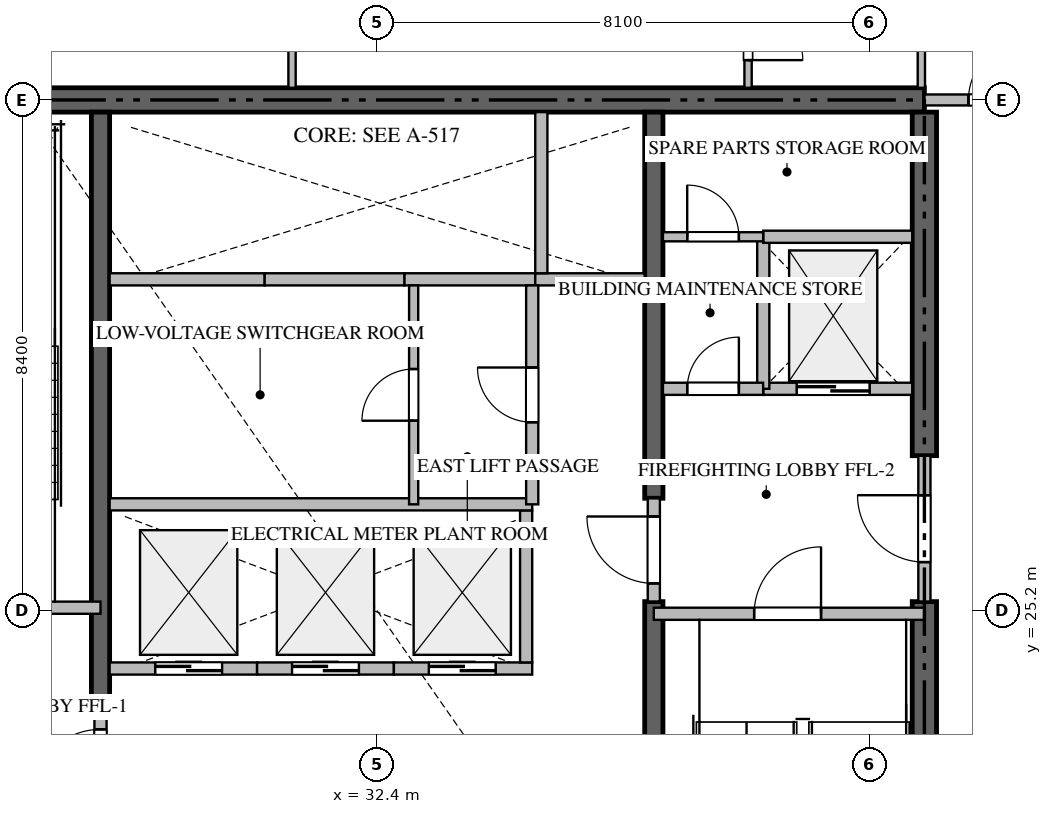
"""IFC4 building model, lengths in metres.
Left out: names, types, materials, properties, quantities, classifications, styles, units other than length and angle.
Written with IfcOpenShell. Run it as: python <this file> out.ifc"""

import sys

from ifc_helpers import new_model, si_unit, direction, frame, frame_2d, origin, place, context, subcontext, project, spatial, rectangle, extrude, source, transform, mapped, element, fill, save


model = new_model("IFC4")
c1 = context("Model", 3, precision=1e-05, world=origin(), true_north=direction((0.0, 1.0)))
c2 = subcontext(c1, "Body", "Model", "MODEL_VIEW")
j1 = project(units=[si_unit("LENGTHUNIT", "METRE"), si_unit("PLANEANGLEUNIT", "RADIAN")], contexts=[c1])
p1 = place(None, origin())
s1 = spatial("IfcSite", under=j1, at=p1, CompositionType="ELEMENT")
p2 = place(p1, origin())
s2 = spatial("IfcBuilding", under=s1, at=p2, CompositionType="ELEMENT")
p3 = place(p2, frame((0.0, 0.0, 142.65)))
s3 = spatial("IfcBuildingStorey", under=s2, at=p3, CompositionType="ELEMENT", Elevation=142.65)
p4 = place(p3, frame((41.4, 33.6, -0.26), z_axis=(0.0, 0.0, 1.0), x_axis=(-1.0, 0.0, 0.0)))
e1 = element("IfcWall", 1, at=p4, inside=s3, PredefinedType="SHEAR", context=c2, shape_type="SweptSolid", body=[
    extrude(rectangle(XDim=18.0, YDim=0.4, at=frame_2d((9.0, 0.0))), origin(), (0.0, 0.0, 1.0), 3.748),
])
p5 = place(p3, frame((41.4, 17.0, -0.26), z_axis=(0.0, 0.0, 1.0), x_axis=(0.0, 1.0, 0.0)))
e2 = element("IfcWall", 2, at=p5, inside=s3, PredefinedType="SHEAR", context=c2, shape_type="SweptSolid", body=[
    extrude(rectangle(XDim=8.35, YDim=0.4, at=frame_2d((4.175, 0.0))), origin(), (0.0, 0.0, 1.0), 3.748),
])
p6 = place(p3, frame((41.4, 27.75, -0.26), z_axis=(0.0, 0.0, 1.0), x_axis=(0.0, 1.0, 0.0)))
e3 = element("IfcWall", 3, at=p6, inside=s3, PredefinedType="SHEAR", context=c2, shape_type="SweptSolid", body=[
    extrude(rectangle(XDim=5.65, YDim=0.4, at=frame_2d((2.825, 0.0))), origin(), (0.0, 0.0, 1.0), 3.748),
])
p7 = place(p3, frame((27.85, 23.55, -0.26), z_axis=(0.0, 0.0, 1.0), x_axis=(0.0, 1.0, 0.0)))
e4 = element("IfcWall", 4, at=p7, inside=s3, PredefinedType="SHEAR", context=c2, shape_type="SweptSolid", body=[
    extrude(rectangle(XDim=9.85, YDim=0.3, at=frame_2d((4.925, 0.0))), origin(), (0.0, 0.0, 1.0), 3.748),
])
p8 = place(p3, frame((36.95, 17.0, -0.26), z_axis=(0.0, 0.0, 1.0), x_axis=(0.0, 1.0, 0.0)))
e5 = element("IfcWall", 5, at=p8, inside=s3, PredefinedType="SHEAR", context=c2, shape_type="SweptSolid", body=[
    extrude(rectangle(XDim=8.35, YDim=0.3, at=frame_2d((4.175, 0.0))), origin(), (0.0, 0.0, 1.0), 3.748),
])
p9 = place(p3, frame((36.95, 27.05, -0.26), z_axis=(0.0, 0.0, 1.0), x_axis=(0.0, 1.0, 0.0)))
e6 = element("IfcWall", 6, at=p9, inside=s3, PredefinedType="SHEAR", context=c2, shape_type="SweptSolid", body=[
    extrude(rectangle(XDim=6.35, YDim=0.3, at=frame_2d((3.175, 0.0))), origin(), (0.0, 0.0, 1.0), 3.748),
])
p10 = place(p3, frame((23.4, 25.25, 0.0), z_axis=(0.0, 0.0, 1.0), x_axis=(1.0, 0.0, 0.0)))
e7 = element("IfcWall", 7, at=p10, inside=s3, PredefinedType="STANDARD", context=c2, shape_type="SweptSolid", body=[
    extrude(rectangle(XDim=4.45, YDim=0.2, at=frame_2d((2.225, 0.0))), origin(), (0.0, 0.0, 1.0), 3.49),
])
p11 = place(p10, frame((1.65, 0.0, 0.0)))
e8 = element("IfcOpeningElement", 8, at=p11, cuts=e7, PredefinedType="OPENING", context=c2, shape_type="SweptSolid", body=[
    extrude(rectangle(XDim=1.1, YDim=2.15, at=frame_2d((0.55, 1.075))), frame((0.0, 0.11, 0.0), z_axis=(0.0, -1.0, 0.0), x_axis=(1.0, 0.0, 0.0)), (0.0, 0.0, 1.0), 0.22),
])
p12 = place(p3, frame((36.95, 25.15, 0.0), z_axis=(0.0, 0.0, 1.0), x_axis=(1.0, 0.0, 0.0)))
e9 = element("IfcWall", 9, at=p12, inside=s3, PredefinedType="STANDARD", context=c2, shape_type="SweptSolid", body=[
    extrude(rectangle(XDim=4.45, YDim=0.2, at=frame_2d((2.225, 0.0))), origin(), (0.0, 0.0, 1.0), 3.49),
])
p13 = place(p12, frame((1.65, 0.0, 0.0)))
e10 = element("IfcOpeningElement", 10, at=p13, cuts=e9, PredefinedType="OPENING", context=c2, shape_type="SweptSolid", body=[
    extrude(rectangle(XDim=1.1, YDim=2.15, at=frame_2d((0.55, 1.075))), frame((0.0, 0.11, 0.0), z_axis=(0.0, -1.0, 0.0), x_axis=(1.0, 0.0, 0.0)), (0.0, 0.0, 1.0), 0.22),
])
p14 = place(p3, frame((38.75, 28.85, 0.0), z_axis=(0.0, 0.0, 1.0), x_axis=(1.0, 0.0, 0.0)))
e11 = element("IfcWall", 11, at=p14, inside=s3, PredefinedType="STANDARD", context=c2, shape_type="SweptSolid", body=[
    extrude(rectangle(XDim=2.45, YDim=0.2, at=frame_2d((1.225, 0.0))), origin(), (0.0, 0.0, 1.0), 3.49),
])
p15 = place(p14, frame((0.55, 0.0, 0.0)))
e12 = element("IfcOpeningElement", 12, at=p15, cuts=e11, PredefinedType="OPENING", context=c2, shape_type="SweptSolid", body=[
    extrude(rectangle(XDim=1.2, YDim=2.2, at=frame_2d((0.6, 1.1))), frame((0.0, 0.11, 0.0), z_axis=(0.0, -1.0, 0.0), x_axis=(1.0, 0.0, 0.0)), (0.0, 0.0, 1.0), 0.22),
])
p16 = place(p3, frame((28.0, 24.25, 0.0), z_axis=(0.0, 0.0, 1.0), x_axis=(1.0, 0.0, 0.0)))
e13 = element("IfcWall", 13, at=p16, inside=s3, PredefinedType="STANDARD", context=c2, shape_type="SweptSolid", body=[
    extrude(rectangle(XDim=2.425, YDim=0.2, at=frame_2d((1.212, 0.0))), origin(), (0.0, 0.0, 1.0), 3.49),
])
p17 = place(p16, frame((0.75, 0.0, 0.0)))
e14 = element("IfcOpeningElement", 14, at=p17, cuts=e13, PredefinedType="OPENING", context=c2, shape_type="SweptSolid", body=[
    extrude(rectangle(XDim=1.1, YDim=2.2, at=frame_2d((0.55, 1.1))), frame((0.0, 0.11, 0.0), z_axis=(0.0, -1.0, 0.0), x_axis=(1.0, 0.0, 0.0)), (0.0, 0.0, 1.0), 0.22),
])
p18 = place(p3, frame((30.425, 24.25, 0.0), z_axis=(0.0, 0.0, 1.0), x_axis=(1.0, 0.0, 0.0)))
e15 = element("IfcWall", 15, at=p18, inside=s3, PredefinedType="STANDARD", context=c2, shape_type="SweptSolid", body=[
    extrude(rectangle(XDim=2.25, YDim=0.2, at=frame_2d((1.125, 0.0))), origin(), (0.0, 0.0, 1.0), 3.49),
])
p19 = place(p18, frame((0.575, 0.0, 0.0)))
e16 = element("IfcOpeningElement", 16, at=p19, cuts=e15, PredefinedType="OPENING", context=c2, shape_type="SweptSolid", body=[
    extrude(rectangle(XDim=1.1, YDim=2.2, at=frame_2d((0.55, 1.1))), frame((0.0, 0.11, 0.0), z_axis=(0.0, -1.0, 0.0), x_axis=(1.0, 0.0, 0.0)), (0.0, 0.0, 1.0), 0.22),
])
p20 = place(p3, frame((32.675, 24.25, 0.0), z_axis=(0.0, 0.0, 1.0), x_axis=(1.0, 0.0, 0.0)))
e17 = element("IfcWall", 17, at=p20, inside=s3, PredefinedType="STANDARD", context=c2, shape_type="SweptSolid", body=[
    extrude(rectangle(XDim=2.275, YDim=0.2, at=frame_2d((1.137, 0.0))), origin(), (0.0, 0.0, 1.0), 3.49),
])
p21 = place(p20, frame((0.575, 0.0, 0.0)))
e18 = element("IfcOpeningElement", 18, at=p21, cuts=e17, PredefinedType="OPENING", context=c2, shape_type="SweptSolid", body=[
    extrude(rectangle(XDim=1.1, YDim=2.2, at=frame_2d((0.55, 1.1))), frame((0.0, 0.11, 0.0), z_axis=(0.0, -1.0, 0.0), x_axis=(1.0, 0.0, 0.0)), (0.0, 0.0, 1.0), 0.22),
])
p22 = place(p3, frame((34.85, 24.35, 0.0), z_axis=(0.0, 0.0, 1.0), x_axis=(0.0, 1.0, 0.0)))
e19 = element("IfcWall", 19, at=p22, inside=s3, PredefinedType="STANDARD", context=c2, shape_type="SweptSolid", body=[
    extrude(rectangle(XDim=2.5, YDim=0.2, at=frame_2d((1.25, 0.0))), origin(), (0.0, 0.0, 1.0), 3.49),
])
p23 = place(p3, frame((28.0, 30.65, 0.0), z_axis=(0.0, 0.0, 1.0), x_axis=(1.0, 0.0, 0.0)))
e20 = element("IfcWall", 20, at=p23, inside=s3, PredefinedType="STANDARD", context=c2, shape_type="SweptSolid", body=[
    extrude(rectangle(XDim=2.55, YDim=0.2, at=frame_2d((1.275, 0.0))), origin(), (0.0, 0.0, 1.0), 3.49),
])
p24 = place(p3, frame((30.55, 30.65, 0.0), z_axis=(0.0, 0.0, 1.0), x_axis=(1.0, 0.0, 0.0)))
e21 = element("IfcWall", 21, at=p24, inside=s3, PredefinedType="STANDARD", context=c2, shape_type="SweptSolid", body=[
    extrude(rectangle(XDim=2.3, YDim=0.2, at=frame_2d((1.15, 0.0))), origin(), (0.0, 0.0, 1.0), 3.49),
])
p25 = place(p3, frame((32.85, 30.65, 0.0), z_axis=(0.0, 0.0, 1.0), x_axis=(1.0, 0.0, 0.0)))
e22 = element("IfcWall", 22, at=p25, inside=s3, PredefinedType="STANDARD", context=c2, shape_type="SweptSolid", body=[
    extrude(rectangle(XDim=2.15, YDim=0.2, at=frame_2d((1.075, 0.0))), origin(), (0.0, 0.0, 1.0), 3.49),
])
p26 = place(p3, frame((35.0, 30.65, 0.0), z_axis=(0.0, 0.0, 1.0), x_axis=(1.0, 0.0, 0.0)))
e23 = element("IfcWall", 23, at=p26, inside=s3, PredefinedType="STANDARD", context=c2, shape_type="SweptSolid", body=[
    extrude(rectangle(XDim=1.8, YDim=0.2, at=frame_2d((0.9, 0.0))), origin(), (0.0, 0.0, 1.0), 3.49),
])
p27 = place(p3, frame((35.1, 30.75, 0.0), z_axis=(0.0, 0.0, 1.0), x_axis=(0.0, 1.0, 0.0)))
e24 = element("IfcWall", 24, at=p27, inside=s3, PredefinedType="STANDARD", context=c2, shape_type="SweptSolid", body=[
    extrude(rectangle(XDim=2.65, YDim=0.2, at=frame_2d((1.325, 0.0))), origin(), (0.0, 0.0, 1.0), 3.49),
])
p28 = place(p3, frame((38.75, 28.85, 0.0), z_axis=(0.0, 0.0, 1.0), x_axis=(0.0, 1.0, 0.0)))
e25 = element("IfcWall", 25, at=p28, inside=s3, PredefinedType="STANDARD", context=c2, shape_type="SweptSolid", body=[
    extrude(rectangle(XDim=2.5, YDim=0.2, at=frame_2d((1.25, 0.0))), origin(), (0.0, 0.0, 1.0), 3.49),
])
p29 = place(p3, frame((38.75, 31.35, 0.0), z_axis=(0.0, 0.0, 1.0), x_axis=(1.0, 0.0, 0.0)))
e26 = element("IfcWall", 26, at=p29, inside=s3, PredefinedType="STANDARD", context=c2, shape_type="SweptSolid", body=[
    extrude(rectangle(XDim=2.45, YDim=0.2, at=frame_2d((1.225, 0.0))), origin(), (0.0, 0.0, 1.0), 3.49),
])
p30 = place(p3, frame((37.1, 28.85, 0.0), z_axis=(0.0, 0.0, 1.0), x_axis=(1.0, 0.0, 0.0)))
e27 = element("IfcWall", 27, at=p30, inside=s3, PredefinedType="STANDARD", context=c2, shape_type="SweptSolid", body=[
    extrude(rectangle(XDim=1.648, YDim=0.2, at=frame_2d((0.824, 0.0))), origin(), (0.0, 0.0, 1.0), 3.49),
])
p31 = place(p30, frame((0.399, 0.0, 0.0)))
e28 = element("IfcOpeningElement", 28, at=p31, cuts=e27, PredefinedType="OPENING", context=c2, shape_type="SweptSolid", body=[
    extrude(rectangle(XDim=0.85, YDim=2.1, at=frame_2d((0.425, 1.05))), frame((0.0, 0.11, 0.0), z_axis=(0.0, -1.0, 0.0), x_axis=(1.0, 0.0, 0.0)), (0.0, 0.0, 1.0), 0.22),
])
p32 = place(p3, frame((41.4, 25.352, 0.0), z_axis=(0.0, 0.0, 1.0), x_axis=(0.0, 1.0, 0.0)))
e29 = element("IfcWall", 29, at=p32, inside=s3, PredefinedType="STANDARD", context=c2, shape_type="SweptSolid", body=[
    extrude(rectangle(XDim=2.396, YDim=0.2, at=frame_2d((1.198, 0.0))), origin(), (0.0, 0.0, 1.0), 3.49),
])
p33 = place(p32, frame((0.648, 0.0, 0.0)))
e30 = element("IfcOpeningElement", 30, at=p33, cuts=e29, PredefinedType="OPENING", context=c2, shape_type="SweptSolid", body=[
    extrude(rectangle(XDim=1.1, YDim=2.15, at=frame_2d((0.55, 1.075))), frame((0.0, 0.11, 0.0), z_axis=(0.0, -1.0, 0.0), x_axis=(1.0, 0.0, 0.0)), (0.0, 0.0, 1.0), 0.22),
])
p34 = place(p3, frame((27.85, 21.852, 0.0), z_axis=(0.0, 0.0, 1.0), x_axis=(0.0, 1.0, 0.0)))
e31 = element("IfcWall", 31, at=p34, inside=s3, PredefinedType="STANDARD", context=c2, shape_type="SweptSolid", body=[
    extrude(rectangle(XDim=1.696, YDim=0.2, at=frame_2d((0.848, 0.0))), origin(), (0.0, 0.0, 1.0), 3.49),
])
p35 = place(p34, frame((0.298, 0.0, 0.0)))
e32 = element("IfcOpeningElement", 32, at=p35, cuts=e31, PredefinedType="OPENING", context=c2, shape_type="SweptSolid", body=[
    extrude(rectangle(XDim=1.1, YDim=2.15, at=frame_2d((0.55, 1.075))), frame((0.0, 0.11, 0.0), z_axis=(0.0, -1.0, 0.0), x_axis=(1.0, 0.0, 0.0)), (0.0, 0.0, 1.0), 0.22),
])
p36 = place(p3, frame((36.95, 25.352, 0.0), z_axis=(0.0, 0.0, 1.0), x_axis=(0.0, 1.0, 0.0)))
e33 = element("IfcWall", 33, at=p36, inside=s3, PredefinedType="STANDARD", context=c2, shape_type="SweptSolid", body=[
    extrude(rectangle(XDim=1.696, YDim=0.2, at=frame_2d((0.848, 0.0))), origin(), (0.0, 0.0, 1.0), 3.49),
])
p37 = place(p36, frame((0.298, 0.0, 0.0)))
e34 = element("IfcOpeningElement", 34, at=p37, cuts=e33, PredefinedType="OPENING", context=c2, shape_type="SweptSolid", body=[
    extrude(rectangle(XDim=1.1, YDim=2.15, at=frame_2d((0.55, 1.075))), frame((0.0, 0.11, 0.0), z_axis=(0.0, -1.0, 0.0), x_axis=(1.0, 0.0, 0.0)), (0.0, 0.0, 1.0), 0.22),
])
p38 = place(p3, frame((28.0, 26.95, 0.0), z_axis=(0.0, 0.0, 1.0), x_axis=(1.0, 0.0, 0.0)))
e35 = element("IfcWall", 35, at=p38, inside=s3, PredefinedType="STANDARD", context=c2, shape_type="SweptSolid", body=[
    extrude(rectangle(XDim=6.95, YDim=0.2, at=frame_2d((3.475, 0.0))), origin(), (0.0, 0.0, 1.0), 3.49),
])
p39 = place(p3, frame((37.1, 31.35, 0.0), z_axis=(0.0, 0.0, 1.0), x_axis=(1.0, 0.0, 0.0)))
e36 = element("IfcWall", 36, at=p39, inside=s3, PredefinedType="PARTITIONING", context=c2, shape_type="SweptSolid", body=[
    extrude(rectangle(XDim=1.648, YDim=0.15, at=frame_2d((0.824, 0.0))), origin(), (0.0, 0.0, 1.0), 3.49),
])
p40 = place(p39, frame((0.399, 0.0, 0.0)))
e37 = element("IfcOpeningElement", 37, at=p40, cuts=e36, PredefinedType="OPENING", context=c2, shape_type="SweptSolid", body=[
    extrude(rectangle(XDim=0.85, YDim=2.1, at=frame_2d((0.425, 1.05))), frame((0.0, 0.085, 0.0), z_axis=(0.0, -1.0, 0.0), x_axis=(1.0, 0.0, 0.0)), (0.0, 0.0, 1.0), 0.17),
])
p41 = place(p3, frame((34.95, 26.95, 0.0), z_axis=(0.0, 0.0, 1.0), x_axis=(0.0, 1.0, 0.0)))
e38 = element("IfcWall", 38, at=p41, inside=s3, PredefinedType="STANDARD", context=c2, shape_type="SweptSolid", body=[
    extrude(rectangle(XDim=3.6, YDim=0.2, at=frame_2d((1.8, 0.0))), origin(), (0.0, 0.0, 1.0), 3.49),
])
p42 = place(p41, frame((1.35, 0.0, 0.0)))
e39 = element("IfcOpeningElement", 39, at=p42, cuts=e38, PredefinedType="OPENING", context=c2, shape_type="SweptSolid", body=[
    extrude(rectangle(XDim=0.9, YDim=2.1, at=frame_2d((0.45, 1.05))), frame((0.0, 0.11, 0.0), z_axis=(0.0, -1.0, 0.0), x_axis=(1.0, 0.0, 0.0)), (0.0, 0.0, 1.0), 0.22),
])
p43 = place(p3, frame((33.0, 26.95, 0.0), z_axis=(0.0, 0.0, 1.0), x_axis=(0.0, 1.0, 0.0)))
e40 = element("IfcWall", 40, at=p43, inside=s3, PredefinedType="PARTITIONING", context=c2, shape_type="SweptSolid", body=[
    extrude(rectangle(XDim=3.6, YDim=0.15, at=frame_2d((1.8, 0.0))), origin(), (0.0, 0.0, 1.0), 3.49),
])
p44 = place(p43, frame((1.375, 0.0, 0.0)))
e41 = element("IfcOpeningElement", 41, at=p44, cuts=e40, PredefinedType="OPENING", context=c2, shape_type="SweptSolid", body=[
    extrude(rectangle(XDim=0.85, YDim=2.1, at=frame_2d((0.425, 1.05))), frame((0.0, 0.085, 0.0), z_axis=(0.0, -1.0, 0.0), x_axis=(1.0, 0.0, 0.0)), (0.0, 0.0, 1.0), 0.17),
])
p45 = place(p3, frame((41.402, 33.6, 0.0), z_axis=(0.0, 0.0, 1.0), x_axis=(1.0, 0.0, 0.0)))
e42 = element("IfcWall", 42, at=p45, inside=s3, PredefinedType="PARTITIONING", context=c2, shape_type="SweptSolid", body=[
    extrude(rectangle(XDim=2.446, YDim=0.18, at=frame_2d((1.223, 0.0))), origin(), (0.0, 0.0, 1.0), 3.49),
])
p46 = place(p45, frame((0.723, 0.0, 0.0)))
e43 = element("IfcOpeningElement", 43, at=p46, cuts=e42, PredefinedType="OPENING", context=c2, shape_type="SweptSolid", body=[
    extrude(rectangle(XDim=1.0, YDim=2.15, at=frame_2d((0.5, 1.075))), frame((0.0, 0.1, 0.0), z_axis=(0.0, -1.0, 0.0), x_axis=(1.0, 0.0, 0.0)), (0.0, 0.0, 1.0), 0.2),
])
p47 = place(p3, frame((41.35, 36.35, 0.0), z_axis=(0.0, 0.0, 1.0), x_axis=(0.0, -1.0, 0.0)))
e44 = element("IfcWall", 44, at=p47, inside=s3, PredefinedType="PARTITIONING", context=c2, shape_type="SweptSolid", body=[
    extrude(rectangle(XDim=2.55, YDim=0.12, at=frame_2d((1.275, 0.0))), origin(), (0.0, 0.0, 1.0), 3.49),
])
p48 = place(p3, frame((38.5, 35.75, 0.0), z_axis=(0.0, 0.0, 1.0), x_axis=(0.0, -1.0, 0.0)))
e45 = element("IfcWall", 45, at=p48, inside=s3, PredefinedType="PARTITIONING", context=c2, shape_type="SweptSolid", body=[
    extrude(rectangle(XDim=1.95, YDim=0.12, at=frame_2d((0.975, 0.0))), origin(), (0.0, 0.0, 1.0), 3.49),
])
p49 = place(p48, frame((0.595, 0.0, 0.0)))
e46 = element("IfcOpeningElement", 46, at=p49, cuts=e45, PredefinedType="OPENING", context=c2, shape_type="SweptSolid", body=[
    extrude(rectangle(XDim=0.9, YDim=2.1, at=frame_2d((0.45, 1.05))), frame((0.0, 0.07, 0.0), z_axis=(0.0, -1.0, 0.0), x_axis=(1.0, 0.0, 0.0)), (0.0, 0.0, 1.0), 0.14),
])
p50 = place(p3, frame((31.0, 35.748, 0.0), z_axis=(0.0, 0.0, 1.0), x_axis=(0.0, -1.0, 0.0)))
e47 = element("IfcWall", 47, at=p50, inside=s3, PredefinedType="PARTITIONING", context=c2, shape_type="SweptSolid", body=[
    extrude(rectangle(XDim=1.948, YDim=0.12, at=frame_2d((0.974, 0.0))), origin(), (0.0, 0.0, 1.0), 3.49),
])
m1 = source(origin(), c2, "Body", "SweptSolid", [
    extrude(rectangle(XDim=1.1, YDim=2.15, at=frame_2d((0.55, 1.075))), frame((0.0, 0.025, 0.0), z_axis=(0.0, -1.0, 0.0), x_axis=(1.0, 0.0, 0.0)), (0.0, 0.0, 1.0), 0.05),
])
p51 = place(p13, origin())
e48 = element("IfcDoor", 48, at=p51, inside=s3, OperationType="SINGLE_SWING_RIGHT", PredefinedType="DOOR", context=c2, shape_type="MappedRepresentation", body=[
    mapped(m1, transform((0.0, 0.0, 0.0), scale=1.0)),
])
fill(e10, e48)
m2 = source(origin(), c2, "Body", "SweptSolid", [
    extrude(rectangle(XDim=1.2, YDim=2.2, at=frame_2d((0.6, 1.1))), frame((0.0, 0.025, 0.0), z_axis=(0.0, -1.0, 0.0), x_axis=(1.0, 0.0, 0.0)), (0.0, 0.0, 1.0), 0.05),
])
p52 = place(p15, origin())
e49 = element("IfcDoor", 49, at=p52, inside=s3, OperationType="DOUBLE_DOOR_SLIDING", PredefinedType="DOOR", context=c2, shape_type="MappedRepresentation", body=[
    mapped(m2, transform((0.0, 0.0, 0.0), scale=1.0)),
])
fill(e12, e49)
m3 = source(origin(), c2, "Body", "SweptSolid", [
    extrude(rectangle(XDim=1.1, YDim=2.2, at=frame_2d((0.55, 1.1))), frame((0.0, 0.025, 0.0), z_axis=(0.0, -1.0, 0.0), x_axis=(1.0, 0.0, 0.0)), (0.0, 0.0, 1.0), 0.05),
])
p53 = place(p17, origin())
e50 = element("IfcDoor", 50, at=p53, inside=s3, OperationType="DOUBLE_DOOR_SLIDING", PredefinedType="DOOR", context=c2, shape_type="MappedRepresentation", body=[
    mapped(m3, transform((0.0, 0.0, 0.0), scale=1.0)),
])
fill(e14, e50)
p54 = place(p19, origin())
e51 = element("IfcDoor", 51, at=p54, inside=s3, OperationType="DOUBLE_DOOR_SLIDING", PredefinedType="DOOR", context=c2, shape_type="MappedRepresentation", body=[
    mapped(m3, transform((0.0, 0.0, 0.0), scale=1.0)),
])
fill(e16, e51)
p55 = place(p21, origin())
e52 = element("IfcDoor", 52, at=p55, inside=s3, OperationType="DOUBLE_DOOR_SLIDING", PredefinedType="DOOR", context=c2, shape_type="MappedRepresentation", body=[
    mapped(m3, transform((0.0, 0.0, 0.0), scale=1.0)),
])
fill(e18, e52)
m4 = source(origin(), c2, "Body", "SweptSolid", [
    extrude(rectangle(XDim=0.85, YDim=2.1, at=frame_2d((0.425, 1.05))), frame((0.0, 0.025, 0.0), z_axis=(0.0, -1.0, 0.0), x_axis=(1.0, 0.0, 0.0)), (0.0, 0.0, 1.0), 0.05),
])
p56 = place(p31, origin())
e53 = element("IfcDoor", 53, at=p56, inside=s3, OperationType="SINGLE_SWING_RIGHT", PredefinedType="DOOR", context=c2, shape_type="MappedRepresentation", body=[
    mapped(m4, transform((0.0, 0.0, 0.0), scale=1.0)),
])
fill(e28, e53)
p57 = place(p33, origin())
e54 = element("IfcDoor", 54, at=p57, inside=s3, OperationType="SINGLE_SWING_RIGHT", PredefinedType="DOOR", context=c2, shape_type="MappedRepresentation", body=[
    mapped(m1, transform((0.0, 0.0, 0.0), scale=1.0)),
])
fill(e30, e54)
p58 = place(p35, origin())
e55 = element("IfcDoor", 55, at=p58, inside=s3, OperationType="SINGLE_SWING_LEFT", PredefinedType="DOOR", context=c2, shape_type="MappedRepresentation", body=[
    mapped(m1, transform((0.0, 0.0, 0.0), scale=1.0)),
])
fill(e32, e55)
p59 = place(p37, origin())
e56 = element("IfcDoor", 56, at=p59, inside=s3, OperationType="SINGLE_SWING_RIGHT", PredefinedType="DOOR", context=c2, shape_type="MappedRepresentation", body=[
    mapped(m1, transform((0.0, 0.0, 0.0), scale=1.0)),
])
fill(e34, e56)
p60 = place(p40, origin())
e57 = element("IfcDoor", 57, at=p60, inside=s3, OperationType="SINGLE_SWING_LEFT", PredefinedType="DOOR", context=c2, shape_type="MappedRepresentation", body=[
    mapped(m4, transform((0.0, 0.0, 0.0), scale=1.0)),
])
fill(e37, e57)
m5 = source(origin(), c2, "Body", "SweptSolid", [
    extrude(rectangle(XDim=0.9, YDim=2.1, at=frame_2d((0.45, 1.05))), frame((0.0, 0.025, 0.0), z_axis=(0.0, -1.0, 0.0), x_axis=(1.0, 0.0, 0.0)), (0.0, 0.0, 1.0), 0.05),
])
p61 = place(p42, origin())
e58 = element("IfcDoor", 58, at=p61, inside=s3, OperationType="SINGLE_SWING_RIGHT", PredefinedType="DOOR", context=c2, shape_type="MappedRepresentation", body=[
    mapped(m5, transform((0.0, 0.0, 0.0), scale=1.0)),
])
fill(e39, e58)
p62 = place(p44, origin())
e59 = element("IfcDoor", 59, at=p62, inside=s3, OperationType="SINGLE_SWING_LEFT", PredefinedType="DOOR", context=c2, shape_type="MappedRepresentation", body=[
    mapped(m4, transform((0.0, 0.0, 0.0), scale=1.0)),
])
fill(e41, e59)
m6 = source(origin(), c2, "Body", "SweptSolid", [
    extrude(rectangle(XDim=1.0, YDim=2.15, at=frame_2d((0.5, 1.075))), frame((0.0, 0.025, 0.0), z_axis=(0.0, -1.0, 0.0), x_axis=(1.0, 0.0, 0.0)), (0.0, 0.0, 1.0), 0.05),
])
p63 = place(p46, origin())
e60 = element("IfcDoor", 60, at=p63, inside=s3, OperationType="SINGLE_SWING_RIGHT", PredefinedType="DOOR", context=c2, shape_type="MappedRepresentation", body=[
    mapped(m6, transform((0.0, 0.0, 0.0), scale=1.0)),
])
fill(e43, e60)
p64 = place(p49, origin())
e61 = element("IfcDoor", 61, at=p64, inside=s3, OperationType="SINGLE_SWING_RIGHT", PredefinedType="DOOR", context=c2, shape_type="MappedRepresentation", body=[
    mapped(m5, transform((0.0, 0.0, 0.0), scale=1.0)),
])
fill(e46, e61)
save(model, sys.argv[1])
